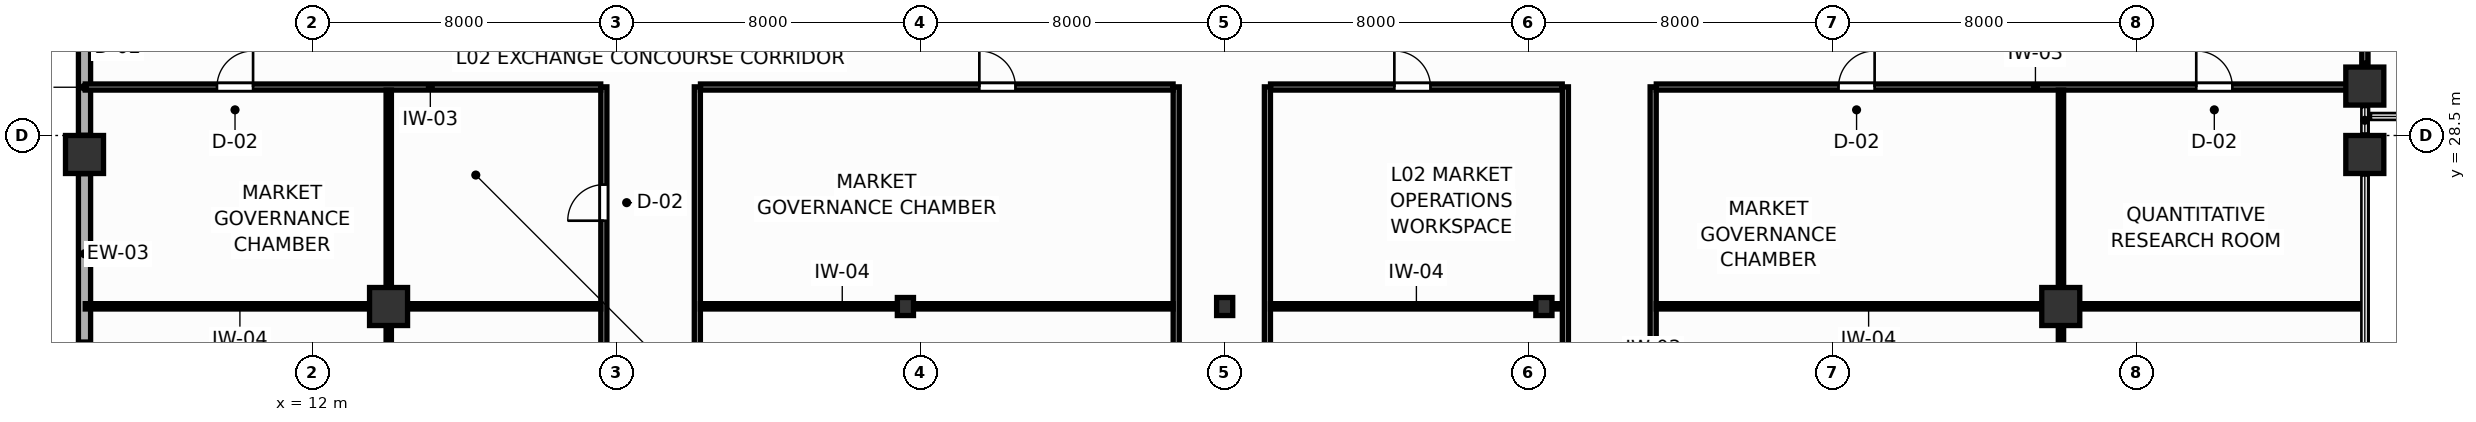
"""IFC4 building model, lengths in metres.
Left out: names, types, materials, properties, quantities, classifications, styles, units other than length and angle.
Written with IfcOpenShell. Run it as: python <this file> out.ifc"""

import sys

from ifc_helpers import new_model, si_unit, direction, frame, frame_2d, origin, origin_2d, place, context, subcontext, project, spatial, rectangle, i_section, extrude, source, transform, mapped, element, fill, save


model = new_model("IFC4")
c1 = context("Model", 3, precision=1e-05, world=origin(), true_north=direction((0.0, 1.0)))
c2 = subcontext(c1, "Body", "Model", "MODEL_VIEW")
j1 = project(units=[si_unit("LENGTHUNIT", "METRE"), si_unit("PLANEANGLEUNIT", "RADIAN")], contexts=[c1])
p1 = place(None, origin())
s1 = spatial("IfcSite", under=j1, at=p1, CompositionType="ELEMENT")
p2 = place(p1, origin())
s2 = spatial("IfcBuilding", under=s1, at=p2, CompositionType="ELEMENT")
p3 = place(p2, frame((0.0, 0.0, 9.6)))
s3 = spatial("IfcBuildingStorey", under=s2, at=p3, CompositionType="ELEMENT", Elevation=9.6)
m1 = source(origin(), c2, "Body", "SweptSolid", [
    extrude(i_section(OverallWidth=0.424, OverallDepth=0.474, WebThickness=0.045, FlangeThickness=0.072, FilletRadius=0.015, at=origin_2d()), origin(), (0.0, 0.0, 1.0), 4.8),
])
for number, where, z_axis, x_axis in (
    (1, (27.6, 24.0, 0.0), (0.0, 0.0, 1.0), (1.0, 0.0, 0.0)),
    (2, (44.4, 24.0, 0.0), (0.0, 0.0, 1.0), (1.0, 0.0, 0.0)),
    (3, (36.0, 24.0, 0.0), (0.0, 0.0, 1.0), (1.0, 0.0, 0.0)),
):
    element("IfcColumn", number, at=place(p3, frame(where, z_axis=z_axis, x_axis=x_axis)), inside=s3, PredefinedType="COLUMN", context=c2, shape_type="MappedRepresentation", body=[
        mapped(m1, transform((0.0, 0.0, 0.0), scale=1.0)),
    ])
m2 = source(origin(), c2, "Body", "SweptSolid", [
    extrude(rectangle(XDim=1.0, YDim=1.0, at=origin_2d()), origin(), (0.0, 0.0, 1.0), 4.8),
])
for number, where, z_axis, x_axis in (
    (4, (6.0, 28.0, 0.0), (0.0, 0.0, 1.0), (1.0, 0.0, 0.0)),
    (5, (66.0, 28.0, 0.0), (0.0, 0.0, 1.0), (1.0, 0.0, 0.0)),
    (6, (14.0, 24.0, 0.0), (0.0, 0.0, 1.0), (1.0, 0.0, 0.0)),
    (7, (58.0, 24.0, 0.0), (0.0, 0.0, 1.0), (1.0, 0.0, 0.0)),
    (8, (66.0, 29.8, 0.0), (0.0, 0.0, 1.0), (1.0, 0.0, 0.0)),
):
    element("IfcColumn", number, at=place(p3, frame(where, z_axis=z_axis, x_axis=x_axis)), inside=s3, PredefinedType="COLUMN", context=c2, shape_type="MappedRepresentation", body=[
        mapped(m2, transform((0.0, 0.0, 0.0), scale=1.0)),
    ])
p4 = place(p3, frame((6.0, 16.505, 0.0), z_axis=(0.0, 0.0, 1.0), x_axis=(0.0, 1.0, 0.0)))
e9 = element("IfcWall", 9, at=p4, inside=s3, PredefinedType="SOLIDWALL", context=c2, shape_type="SweptSolid", body=[
    extrude(rectangle(XDim=10.99, YDim=0.32, at=frame_2d((5.495, 0.0))), origin(), (0.0, 0.0, 1.0), 4.35),
])
p5 = place(p4, frame((4.395, 0.0, 0.75)))
e10 = element("IfcOpeningElement", 10, at=p5, cuts=e9, PredefinedType="OPENING", context=c2, shape_type="SweptSolid", body=[
    extrude(rectangle(XDim=2.2, YDim=2.0, at=frame_2d((1.1, 1.0))), frame((0.0, 0.17, 0.0), z_axis=(0.0, -1.0, 0.0), x_axis=(1.0, 0.0, 0.0)), (0.0, 0.0, 1.0), 0.34),
])
p6 = place(p3, frame((6.0, 28.505, 0.0), z_axis=(0.0, 0.0, 1.0), x_axis=(0.0, 1.0, 0.0)))
e11 = element("IfcWall", 11, at=p6, inside=s3, PredefinedType="SOLIDWALL", context=c2, shape_type="SweptSolid", body=[
    extrude(rectangle(XDim=10.99, YDim=0.32, at=frame_2d((5.495, 0.0))), origin(), (0.0, 0.0, 1.0), 4.35),
])
p7 = place(p6, frame((4.395, 0.0, 0.75)))
e12 = element("IfcOpeningElement", 12, at=p7, cuts=e11, PredefinedType="OPENING", context=c2, shape_type="SweptSolid", body=[
    extrude(rectangle(XDim=2.2, YDim=2.0, at=frame_2d((1.1, 1.0))), frame((0.0, 0.17, 0.0), z_axis=(0.0, -1.0, 0.0), x_axis=(1.0, 0.0, 0.0)), (0.0, 0.0, 1.0), 0.34),
])
p8 = place(p3, frame((66.0, 30.4, 0.0), z_axis=(0.0, 0.0, 1.0), x_axis=(0.0, 1.0, 0.0)))
e13 = element("IfcWall", 13, at=p8, inside=s3, PredefinedType="PARTITIONING", context=c2, shape_type="SweptSolid", body=[
    extrude(rectangle(XDim=11.2, YDim=0.16, at=frame_2d((5.6, 0.0))), origin(), (0.0, 0.0, 1.0), 4.35),
])
p9 = place(p8, frame((0.45, 0.0, 0.0)))
e14 = element("IfcOpeningElement", 14, at=p9, cuts=e13, PredefinedType="OPENING", context=c2, shape_type="SweptSolid", body=[
    extrude(rectangle(XDim=1.3, YDim=2.1, at=frame_2d((0.65, 1.05))), frame((0.0, 0.09, 0.0), z_axis=(0.0, -1.0, 0.0), x_axis=(1.0, 0.0, 0.0)), (0.0, 0.0, 1.0), 0.18),
])
p10 = place(p3, frame((47.275, 3.02, 0.0), z_axis=(0.0, 0.0, 1.0), x_axis=(0.0, 1.0, 0.0)))
e15 = element("IfcWall", 15, at=p10, inside=s3, PredefinedType="PARTITIONING", context=c2, shape_type="SweptSolid", body=[
    extrude(rectangle(XDim=26.76, YDim=0.16, at=frame_2d((13.38, 0.0))), origin(), (0.0, 0.0, 1.0), 4.35),
])
p11 = place(p10, frame((10.07, 0.0, 0.0)))
e16 = element("IfcOpeningElement", 16, at=p11, cuts=e15, PredefinedType="OPENING", context=c2, shape_type="SweptSolid", body=[
    extrude(rectangle(XDim=0.95, YDim=2.05, at=frame_2d((0.475, 1.025))), frame((0.0, 0.09, 0.0), z_axis=(0.0, -1.0, 0.0), x_axis=(1.0, 0.0, 0.0)), (0.0, 0.0, 1.0), 0.18),
])
p12 = place(p3, frame((44.965, 3.02, 0.0), z_axis=(0.0, 0.0, 1.0), x_axis=(0.0, 1.0, 0.0)))
e17 = element("IfcWall", 17, at=p12, inside=s3, PredefinedType="PARTITIONING", context=c2, shape_type="SweptSolid", body=[
    extrude(rectangle(XDim=26.76, YDim=0.16, at=frame_2d((13.38, 0.0))), origin(), (0.0, 0.0, 1.0), 2.35),
])
p13 = place(p12, frame((6.82, 0.0, 0.0)))
e18 = element("IfcOpeningElement", 18, at=p13, cuts=e17, PredefinedType="OPENING", context=c2, shape_type="SweptSolid", body=[
    extrude(rectangle(XDim=0.95, YDim=2.05, at=frame_2d((0.475, 1.025))), frame((0.0, 0.09, 0.0), z_axis=(0.0, -1.0, 0.0), x_axis=(1.0, 0.0, 0.0)), (0.0, 0.0, 1.0), 0.18),
])
p14 = place(p3, frame((37.125, 3.02, 0.0), z_axis=(0.0, 0.0, 1.0), x_axis=(0.0, 1.0, 0.0)))
e19 = element("IfcWall", 19, at=p14, inside=s3, PredefinedType="PARTITIONING", context=c2, shape_type="SweptSolid", body=[
    extrude(rectangle(XDim=26.76, YDim=0.16, at=frame_2d((13.38, 0.0))), origin(), (0.0, 0.0, 1.0), 4.35),
])
p15 = place(p3, frame((22.125, 3.02, 0.0), z_axis=(0.0, 0.0, 1.0), x_axis=(0.0, 1.0, 0.0)))
e20 = element("IfcWall", 20, at=p15, inside=s3, PredefinedType="PARTITIONING", context=c2, shape_type="SweptSolid", body=[
    extrude(rectangle(XDim=26.76, YDim=0.16, at=frame_2d((13.38, 0.0))), origin(), (0.0, 0.0, 1.0), 4.35),
])
p16 = place(p15, frame((10.07, 0.0, 0.0)))
e21 = element("IfcOpeningElement", 21, at=p16, cuts=e20, PredefinedType="OPENING", context=c2, shape_type="SweptSolid", body=[
    extrude(rectangle(XDim=0.95, YDim=2.05, at=frame_2d((0.475, 1.025))), frame((0.0, 0.09, 0.0), z_axis=(0.0, -1.0, 0.0), x_axis=(1.0, 0.0, 0.0)), (0.0, 0.0, 1.0), 0.18),
])
p17 = place(p3, frame((34.725, 3.02, 0.0), z_axis=(0.0, 0.0, 1.0), x_axis=(0.0, 1.0, 0.0)))
e22 = element("IfcWall", 22, at=p17, inside=s3, PredefinedType="PARTITIONING", context=c2, shape_type="SweptSolid", body=[
    extrude(rectangle(XDim=26.76, YDim=0.16, at=frame_2d((13.38, 0.0))), origin(), (0.0, 0.0, 1.0), 4.35),
])
p18 = place(p3, frame((19.665, 3.02, 0.0), z_axis=(0.0, 0.0, 1.0), x_axis=(0.0, 1.0, 0.0)))
e23 = element("IfcWall", 23, at=p18, inside=s3, PredefinedType="PARTITIONING", context=c2, shape_type="SweptSolid", body=[
    extrude(rectangle(XDim=26.76, YDim=0.16, at=frame_2d((13.38, 0.0))), origin(), (0.0, 0.0, 1.0), 4.35),
])
p19 = place(p18, frame((6.82, 0.0, 0.0)))
e24 = element("IfcOpeningElement", 24, at=p19, cuts=e23, PredefinedType="OPENING", context=c2, shape_type="SweptSolid", body=[
    extrude(rectangle(XDim=0.95, YDim=2.05, at=frame_2d((0.475, 1.025))), frame((0.0, 0.09, 0.0), z_axis=(0.0, -1.0, 0.0), x_axis=(1.0, 0.0, 0.0)), (0.0, 0.0, 1.0), 0.18),
])
p20 = place(p18, frame((23.238, 0.0, 0.0)))
e25 = element("IfcOpeningElement", 25, at=p20, cuts=e23, PredefinedType="OPENING", context=c2, shape_type="SweptSolid", body=[
    extrude(rectangle(XDim=0.95, YDim=2.05, at=frame_2d((0.475, 1.025))), frame((0.0, 0.09, 0.0), z_axis=(0.0, -1.0, 0.0), x_axis=(1.0, 0.0, 0.0)), (0.0, 0.0, 1.0), 0.18),
])
p21 = place(p3, frame((47.357, 29.775, 0.0), z_axis=(0.0, 0.0, 1.0), x_axis=(1.0, 0.0, 0.0)))
e26 = element("IfcWall", 26, at=p21, inside=s3, PredefinedType="PARTITIONING", context=c2, shape_type="SweptSolid", body=[
    extrude(rectangle(XDim=18.623, YDim=0.16, at=frame_2d((9.312, 0.0))), origin(), (0.0, 0.0, 1.0), 4.35),
])
p22 = place(p21, frame((4.795, 0.0, 0.0)))
e27 = element("IfcOpeningElement", 27, at=p22, cuts=e26, PredefinedType="OPENING", context=c2, shape_type="SweptSolid", body=[
    extrude(rectangle(XDim=0.95, YDim=2.05, at=frame_2d((0.475, 1.025))), frame((0.0, 0.09, 0.0), z_axis=(0.0, -1.0, 0.0), x_axis=(1.0, 0.0, 0.0)), (0.0, 0.0, 1.0), 0.18),
])
p23 = place(p21, frame((14.208, 0.0, 0.0)))
e28 = element("IfcOpeningElement", 28, at=p23, cuts=e26, PredefinedType="OPENING", context=c2, shape_type="SweptSolid", body=[
    extrude(rectangle(XDim=0.95, YDim=2.05, at=frame_2d((0.475, 1.025))), frame((0.0, 0.09, 0.0), z_axis=(0.0, -1.0, 0.0), x_axis=(1.0, 0.0, 0.0)), (0.0, 0.0, 1.0), 0.18),
])
p24 = place(p3, frame((6.02, 29.775, 0.0), z_axis=(0.0, 0.0, 1.0), x_axis=(1.0, 0.0, 0.0)))
e29 = element("IfcWall", 29, at=p24, inside=s3, PredefinedType="PARTITIONING", context=c2, shape_type="SweptSolid", body=[
    extrude(rectangle(XDim=13.563, YDim=0.16, at=frame_2d((6.781, 0.0))), origin(), (0.0, 0.0, 1.0), 4.35),
])
p25 = place(p24, frame((3.465, 0.0, 0.0)))
e30 = element("IfcOpeningElement", 30, at=p25, cuts=e29, PredefinedType="OPENING", context=c2, shape_type="SweptSolid", body=[
    extrude(rectangle(XDim=0.95, YDim=2.05, at=frame_2d((0.475, 1.025))), frame((0.0, 0.09, 0.0), z_axis=(0.0, -1.0, 0.0), x_axis=(1.0, 0.0, 0.0)), (0.0, 0.0, 1.0), 0.18),
])
p26 = place(p3, frame((22.207, 29.775, 0.0), z_axis=(0.0, 0.0, 1.0), x_axis=(1.0, 0.0, 0.0)))
e31 = element("IfcWall", 31, at=p26, inside=s3, PredefinedType="PARTITIONING", context=c2, shape_type="SweptSolid", body=[
    extrude(rectangle(XDim=12.436, YDim=0.16, at=frame_2d((6.218, 0.0))), origin(), (0.0, 0.0, 1.0), 4.35),
])
p27 = place(p26, frame((7.338, 0.0, 0.0)))
e32 = element("IfcOpeningElement", 32, at=p27, cuts=e31, PredefinedType="OPENING", context=c2, shape_type="SweptSolid", body=[
    extrude(rectangle(XDim=0.95, YDim=2.05, at=frame_2d((0.475, 1.025))), frame((0.0, 0.09, 0.0), z_axis=(0.0, -1.0, 0.0), x_axis=(1.0, 0.0, 0.0)), (0.0, 0.0, 1.0), 0.18),
])
p28 = place(p3, frame((37.207, 29.775, 0.0), z_axis=(0.0, 0.0, 1.0), x_axis=(1.0, 0.0, 0.0)))
e33 = element("IfcWall", 33, at=p28, inside=s3, PredefinedType="PARTITIONING", context=c2, shape_type="SweptSolid", body=[
    extrude(rectangle(XDim=7.676, YDim=0.16, at=frame_2d((3.838, 0.0))), origin(), (0.0, 0.0, 1.0), 4.35),
])
p29 = place(p28, frame((3.258, 0.0, 0.0)))
e34 = element("IfcOpeningElement", 34, at=p29, cuts=e33, PredefinedType="OPENING", context=c2, shape_type="SweptSolid", body=[
    extrude(rectangle(XDim=0.95, YDim=2.05, at=frame_2d((0.475, 1.025))), frame((0.0, 0.09, 0.0), z_axis=(0.0, -1.0, 0.0), x_axis=(1.0, 0.0, 0.0)), (0.0, 0.0, 1.0), 0.18),
])
p30 = place(p3, frame((58.005, 3.02, 0.0), z_axis=(0.0, 0.0, 1.0), x_axis=(0.0, 1.0, 0.0)))
e35 = element("IfcWall", 35, at=p30, inside=s3, PredefinedType="PARTITIONING", context=c2, shape_type="SweptSolid", body=[
    extrude(rectangle(XDim=26.673, YDim=0.14, at=frame_2d((13.336, 0.0))), origin(), (0.0, 0.0, 1.0), 4.35),
])
p31 = place(p30, frame((10.07, 0.0, 0.0)))
e36 = element("IfcOpeningElement", 36, at=p31, cuts=e35, PredefinedType="OPENING", context=c2, shape_type="SweptSolid", body=[
    extrude(rectangle(XDim=0.95, YDim=2.05, at=frame_2d((0.475, 1.025))), frame((0.0, 0.08, 0.0), z_axis=(0.0, -1.0, 0.0), x_axis=(1.0, 0.0, 0.0)), (0.0, 0.0, 1.0), 0.16),
])
p32 = place(p3, frame((14.005, 3.02, 0.0), z_axis=(0.0, 0.0, 1.0), x_axis=(0.0, 1.0, 0.0)))
e37 = element("IfcWall", 37, at=p32, inside=s3, PredefinedType="PARTITIONING", context=c2, shape_type="SweptSolid", body=[
    extrude(rectangle(XDim=26.673, YDim=0.14, at=frame_2d((13.336, 0.0))), origin(), (0.0, 0.0, 1.0), 4.35),
])
p33 = place(p32, frame((10.07, 0.0, 0.0)))
e38 = element("IfcOpeningElement", 38, at=p33, cuts=e37, PredefinedType="OPENING", context=c2, shape_type="SweptSolid", body=[
    extrude(rectangle(XDim=0.95, YDim=2.05, at=frame_2d((0.475, 1.025))), frame((0.0, 0.08, 0.0), z_axis=(0.0, -1.0, 0.0), x_axis=(1.0, 0.0, 0.0)), (0.0, 0.0, 1.0), 0.16),
])
p34 = place(p3, frame((47.357, 24.005, 0.0), z_axis=(0.0, 0.0, 1.0), x_axis=(1.0, 0.0, 0.0)))
e39 = element("IfcWall", 39, at=p34, inside=s3, PredefinedType="PARTITIONING", context=c2, shape_type="SweptSolid", body=[
    extrude(rectangle(XDim=18.623, YDim=0.14, at=frame_2d((9.312, 0.0))), origin(), (0.0, 0.0, 1.0), 2.35),
])
p35 = place(p3, frame((6.02, 24.005, 0.0), z_axis=(0.0, 0.0, 1.0), x_axis=(1.0, 0.0, 0.0)))
e40 = element("IfcWall", 40, at=p35, inside=s3, PredefinedType="PARTITIONING", context=c2, shape_type="SweptSolid", body=[
    extrude(rectangle(XDim=13.563, YDim=0.14, at=frame_2d((6.781, 0.0))), origin(), (0.0, 0.0, 1.0), 2.35),
])
p36 = place(p3, frame((22.207, 24.005, 0.0), z_axis=(0.0, 0.0, 1.0), x_axis=(1.0, 0.0, 0.0)))
e41 = element("IfcWall", 41, at=p36, inside=s3, PredefinedType="PARTITIONING", context=c2, shape_type="SweptSolid", body=[
    extrude(rectangle(XDim=12.436, YDim=0.14, at=frame_2d((6.218, 0.0))), origin(), (0.0, 0.0, 1.0), 2.35),
])
p37 = place(p3, frame((37.207, 24.005, 0.0), z_axis=(0.0, 0.0, 1.0), x_axis=(1.0, 0.0, 0.0)))
e42 = element("IfcWall", 42, at=p37, inside=s3, PredefinedType="PARTITIONING", context=c2, shape_type="SweptSolid", body=[
    extrude(rectangle(XDim=7.676, YDim=0.14, at=frame_2d((3.838, 0.0))), origin(), (0.0, 0.0, 1.0), 2.35),
])
p38 = place(p5, origin())
e43 = element("IfcWindow", 43, at=p38, inside=s3, PartitioningType="SINGLE_PANEL", PredefinedType="WINDOW", context=c2, shape_type="SweptSolid", body=[
    extrude(rectangle(XDim=2.2, YDim=2.0, at=frame_2d((1.1, 1.0))), frame((0.0, 0.03, 0.0), z_axis=(0.0, -1.0, 0.0), x_axis=(1.0, 0.0, 0.0)), (0.0, 0.0, 1.0), 0.06),
])
fill(e10, e43)
p39 = place(p20, origin())
e44 = element("IfcDoor", 44, at=p39, inside=s3, OperationType="SINGLE_SWING_LEFT", PredefinedType="DOOR", context=c2, shape_type="SweptSolid", body=[
    extrude(rectangle(XDim=0.95, YDim=2.05, at=frame_2d((0.475, 1.025))), frame((0.0, 0.025, 0.0), z_axis=(0.0, -1.0, 0.0), x_axis=(1.0, 0.0, 0.0)), (0.0, 0.0, 1.0), 0.05),
])
fill(e25, e44)
p40 = place(p22, origin())
e45 = element("IfcDoor", 45, at=p40, inside=s3, OperationType="SINGLE_SWING_RIGHT", PredefinedType="DOOR", context=c2, shape_type="SweptSolid", body=[
    extrude(rectangle(XDim=0.95, YDim=2.05, at=frame_2d((0.475, 1.025))), frame((0.0, 0.025, 0.0), z_axis=(0.0, -1.0, 0.0), x_axis=(1.0, 0.0, 0.0)), (0.0, 0.0, 1.0), 0.05),
])
fill(e27, e45)
p41 = place(p23, origin())
e46 = element("IfcDoor", 46, at=p41, inside=s3, OperationType="SINGLE_SWING_LEFT", PredefinedType="DOOR", context=c2, shape_type="SweptSolid", body=[
    extrude(rectangle(XDim=0.95, YDim=2.05, at=frame_2d((0.475, 1.025))), frame((0.0, 0.025, 0.0), z_axis=(0.0, -1.0, 0.0), x_axis=(1.0, 0.0, 0.0)), (0.0, 0.0, 1.0), 0.05),
])
fill(e28, e46)
p42 = place(p25, origin())
e47 = element("IfcDoor", 47, at=p42, inside=s3, OperationType="SINGLE_SWING_RIGHT", PredefinedType="DOOR", context=c2, shape_type="SweptSolid", body=[
    extrude(rectangle(XDim=0.95, YDim=2.05, at=frame_2d((0.475, 1.025))), frame((0.0, 0.025, 0.0), z_axis=(0.0, -1.0, 0.0), x_axis=(1.0, 0.0, 0.0)), (0.0, 0.0, 1.0), 0.05),
])
fill(e30, e47)
p43 = place(p27, origin())
e48 = element("IfcDoor", 48, at=p43, inside=s3, OperationType="SINGLE_SWING_LEFT", PredefinedType="DOOR", context=c2, shape_type="SweptSolid", body=[
    extrude(rectangle(XDim=0.95, YDim=2.05, at=frame_2d((0.475, 1.025))), frame((0.0, 0.025, 0.0), z_axis=(0.0, -1.0, 0.0), x_axis=(1.0, 0.0, 0.0)), (0.0, 0.0, 1.0), 0.05),
])
fill(e32, e48)
p44 = place(p29, origin())
e49 = element("IfcDoor", 49, at=p44, inside=s3, OperationType="SINGLE_SWING_LEFT", PredefinedType="DOOR", context=c2, shape_type="SweptSolid", body=[
    extrude(rectangle(XDim=0.95, YDim=2.05, at=frame_2d((0.475, 1.025))), frame((0.0, 0.025, 0.0), z_axis=(0.0, -1.0, 0.0), x_axis=(1.0, 0.0, 0.0)), (0.0, 0.0, 1.0), 0.05),
])
fill(e34, e49)
save(model, sys.argv[1])
